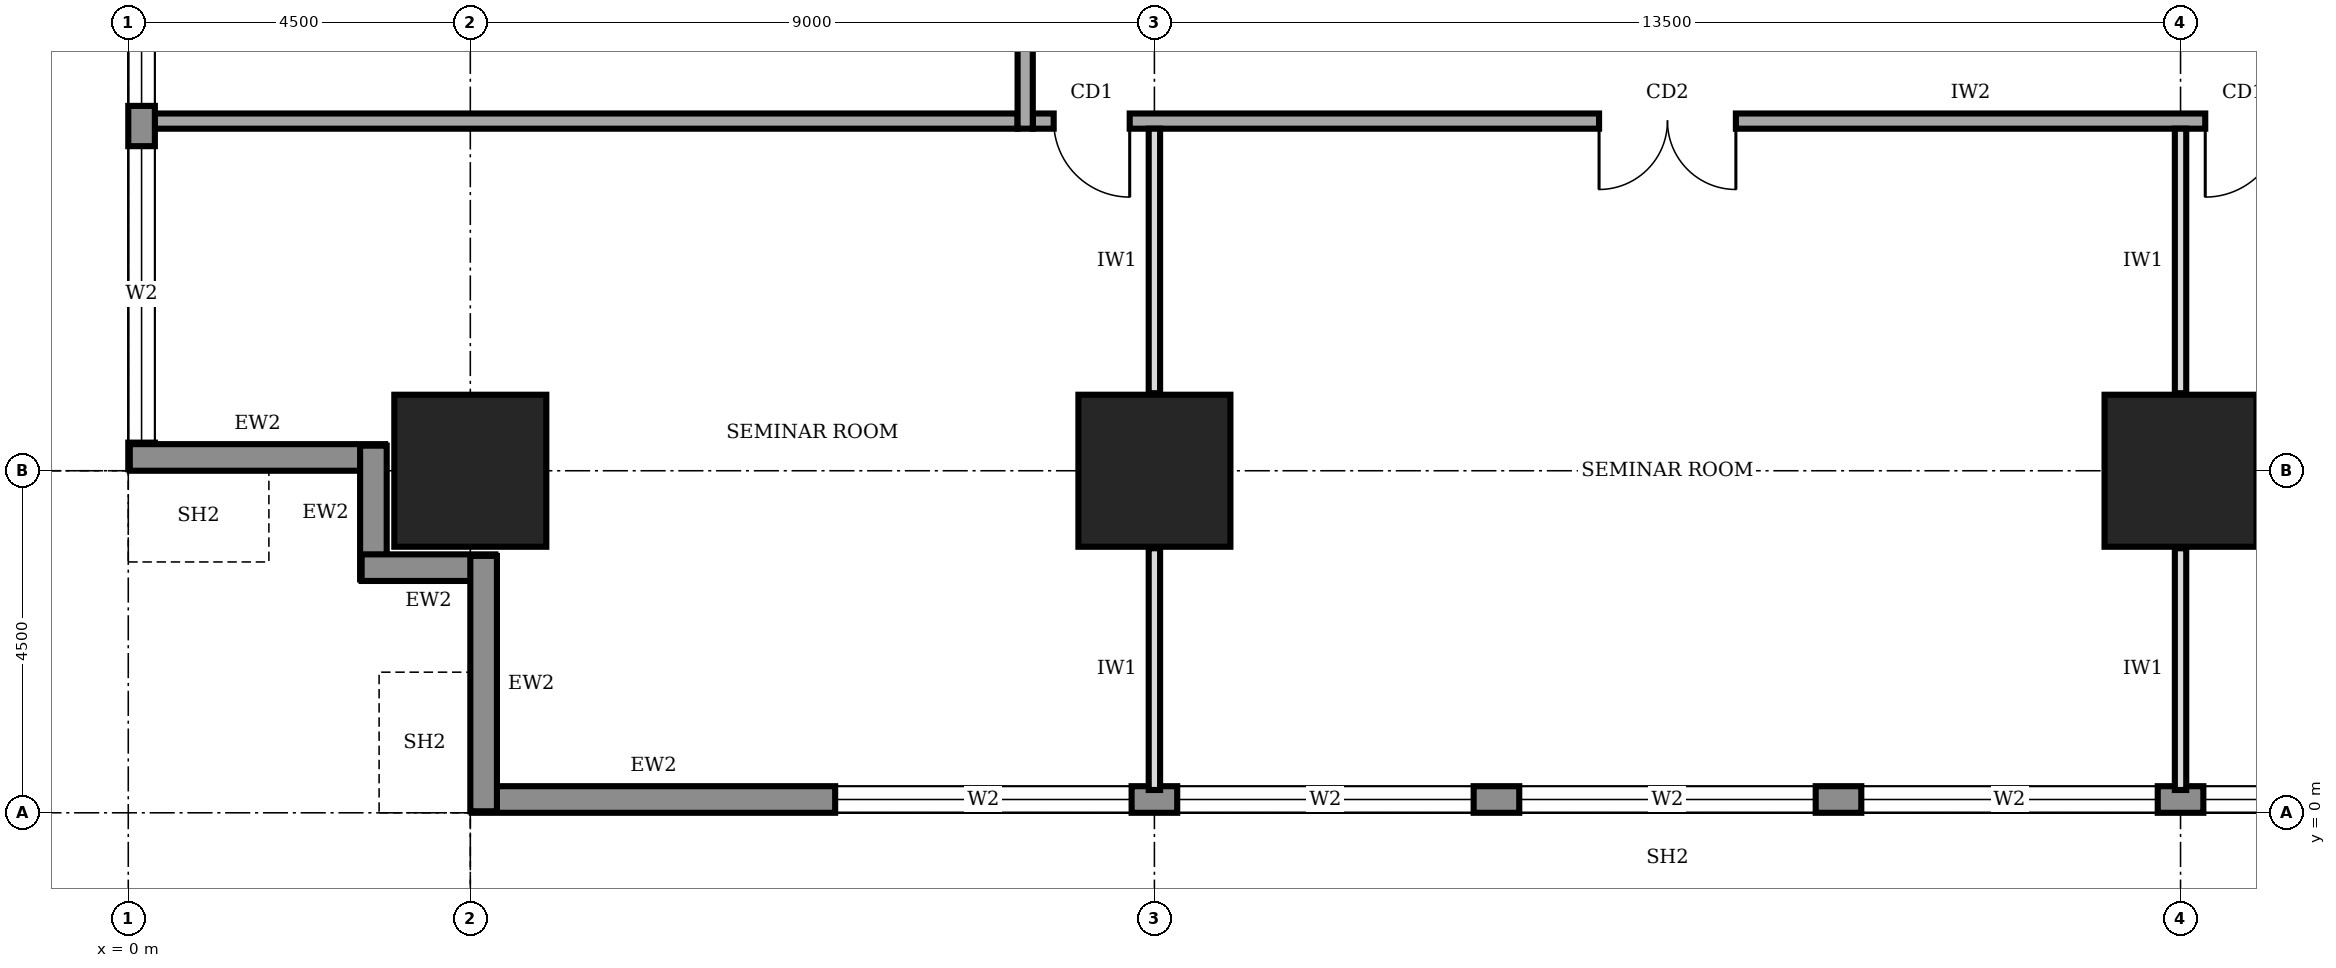
"""IFC4 building model, lengths in metres.
Left out: names, types, materials, properties, quantities, classifications, styles, units other than length and angle.
Written with IfcOpenShell. Run it as: python <this file> out.ifc"""

import sys

from ifc_helpers import new_model, si_unit, direction, frame, frame_2d, origin, origin_2d, place, context, subcontext, project, spatial, rectangle, extrude, element, fill, save


model = new_model("IFC4")
c1 = context("Model", 3, precision=1e-05, world=origin(), true_north=direction((0.0, 1.0)))
c2 = subcontext(c1, "Body", "Model", "MODEL_VIEW")
j1 = project(units=[si_unit("LENGTHUNIT", "METRE"), si_unit("PLANEANGLEUNIT", "RADIAN")], contexts=[c1])
p1 = place(None, origin())
s1 = spatial("IfcSite", under=j1, at=p1, CompositionType="ELEMENT")
p2 = place(p1, origin())
s2 = spatial("IfcBuilding", under=s1, at=p2, CompositionType="ELEMENT")
p3 = place(p2, frame((0.0, 0.0, 49.0)))
s3 = spatial("IfcBuildingStorey", under=s2, at=p3, CompositionType="ELEMENT", Elevation=49.0)
for number, where, z_axis, x_axis in (
    (1, (4.5, 4.5, 0.0), (0.0, 0.0, 1.0), (1.0, 0.0, 0.0)),
    (2, (13.5, 4.5, 0.0), (0.0, 0.0, 1.0), (1.0, 0.0, 0.0)),
    (3, (27.0, 4.5, 0.0), (0.0, 0.0, 1.0), (1.0, 0.0, 0.0)),
):
    element("IfcColumn", number, at=place(p3, frame(where, z_axis=z_axis, x_axis=x_axis)), inside=s3, PredefinedType="COLUMN", context=c2, shape_type="SweptSolid", body=[
        extrude(rectangle(XDim=2.0, YDim=2.0, at=origin_2d()), origin(), (0.0, 0.0, 1.0), 4.0),
    ])
p4 = place(p3, frame((4.52, 0.175, 0.0), z_axis=(0.0, 0.0, 1.0), x_axis=(1.0, 0.0, 0.0)))
e4 = element("IfcWall", 4, at=p4, inside=s3, PredefinedType="STANDARD", context=c2, shape_type="SweptSolid", body=[
    extrude(rectangle(XDim=31.46, YDim=0.35, at=frame_2d((15.73, 0.0))), origin(), (0.0, 0.0, 1.0), 3.75),
])
p5 = place(p4, frame((4.78, 0.0, 0.6)))
e5 = element("IfcOpeningElement", 5, at=p5, cuts=e4, PredefinedType="OPENING", context=c2, shape_type="SweptSolid", body=[
    extrude(rectangle(XDim=3.9, YDim=2.6, at=frame_2d((1.95, 1.3))), frame((0.0, 0.185, 0.0), z_axis=(0.0, -1.0, 0.0), x_axis=(1.0, 0.0, 0.0)), (0.0, 0.0, 1.0), 0.37),
])
p6 = place(p4, frame((9.28, 0.0, 0.6)))
e6 = element("IfcOpeningElement", 6, at=p6, cuts=e4, PredefinedType="OPENING", context=c2, shape_type="SweptSolid", body=[
    extrude(rectangle(XDim=3.9, YDim=2.6, at=frame_2d((1.95, 1.3))), frame((0.0, 0.185, 0.0), z_axis=(0.0, -1.0, 0.0), x_axis=(1.0, 0.0, 0.0)), (0.0, 0.0, 1.0), 0.37),
])
p7 = place(p4, frame((13.78, 0.0, 0.6)))
e7 = element("IfcOpeningElement", 7, at=p7, cuts=e4, PredefinedType="OPENING", context=c2, shape_type="SweptSolid", body=[
    extrude(rectangle(XDim=3.9, YDim=2.6, at=frame_2d((1.95, 1.3))), frame((0.0, 0.185, 0.0), z_axis=(0.0, -1.0, 0.0), x_axis=(1.0, 0.0, 0.0)), (0.0, 0.0, 1.0), 0.37),
])
p8 = place(p4, frame((18.28, 0.0, 0.6)))
e8 = element("IfcOpeningElement", 8, at=p8, cuts=e4, PredefinedType="OPENING", context=c2, shape_type="SweptSolid", body=[
    extrude(rectangle(XDim=3.9, YDim=2.6, at=frame_2d((1.95, 1.3))), frame((0.0, 0.185, 0.0), z_axis=(0.0, -1.0, 0.0), x_axis=(1.0, 0.0, 0.0)), (0.0, 0.0, 1.0), 0.37),
])
p9 = place(p4, frame((22.78, 0.0, 0.6)))
e9 = element("IfcOpeningElement", 9, at=p9, cuts=e4, PredefinedType="OPENING", context=c2, shape_type="SweptSolid", body=[
    extrude(rectangle(XDim=3.9, YDim=2.6, at=frame_2d((1.95, 1.3))), frame((0.0, 0.185, 0.0), z_axis=(0.0, -1.0, 0.0), x_axis=(1.0, 0.0, 0.0)), (0.0, 0.0, 1.0), 0.37),
])
p10 = place(p4, frame((27.21, 0.0, 0.6)))
e10 = element("IfcOpeningElement", 10, at=p10, cuts=e4, PredefinedType="OPENING", context=c2, shape_type="SweptSolid", body=[
    extrude(rectangle(XDim=3.9, YDim=2.6, at=frame_2d((1.95, 1.3))), frame((0.0, 0.185, 0.0), z_axis=(0.0, -1.0, 0.0), x_axis=(1.0, 0.0, 0.0)), (0.0, 0.0, 1.0), 0.37),
])
p11 = place(p3, frame((0.175, 35.98, 0.0), z_axis=(0.0, 0.0, 1.0), x_axis=(0.0, -1.0, 0.0)))
e11 = element("IfcWall", 11, at=p11, inside=s3, PredefinedType="STANDARD", context=c2, shape_type="SweptSolid", body=[
    extrude(rectangle(XDim=31.46, YDim=0.35, at=frame_2d((15.73, 0.0))), origin(), (0.0, 0.0, 1.0), 3.75),
])
p12 = place(p11, frame((27.21, 0.0, 0.6)))
e12 = element("IfcOpeningElement", 12, at=p12, cuts=e11, PredefinedType="OPENING", context=c2, shape_type="SweptSolid", body=[
    extrude(rectangle(XDim=3.9, YDim=2.6, at=frame_2d((1.95, 1.3))), frame((0.0, 0.185, 0.0), z_axis=(0.0, -1.0, 0.0), x_axis=(1.0, 0.0, 0.0)), (0.0, 0.0, 1.0), 0.37),
])
p13 = place(p11, frame((22.78, 0.0, 0.6)))
e13 = element("IfcOpeningElement", 13, at=p13, cuts=e11, PredefinedType="OPENING", context=c2, shape_type="SweptSolid", body=[
    extrude(rectangle(XDim=3.9, YDim=2.6, at=frame_2d((1.95, 1.3))), frame((0.0, 0.185, 0.0), z_axis=(0.0, -1.0, 0.0), x_axis=(1.0, 0.0, 0.0)), (0.0, 0.0, 1.0), 0.37),
])
p14 = place(p11, frame((18.28, 0.0, 0.6)))
e14 = element("IfcOpeningElement", 14, at=p14, cuts=e11, PredefinedType="OPENING", context=c2, shape_type="SweptSolid", body=[
    extrude(rectangle(XDim=3.9, YDim=2.6, at=frame_2d((1.95, 1.3))), frame((0.0, 0.185, 0.0), z_axis=(0.0, -1.0, 0.0), x_axis=(1.0, 0.0, 0.0)), (0.0, 0.0, 1.0), 0.37),
])
p15 = place(p11, frame((13.78, 0.0, 0.6)))
e15 = element("IfcOpeningElement", 15, at=p15, cuts=e11, PredefinedType="OPENING", context=c2, shape_type="SweptSolid", body=[
    extrude(rectangle(XDim=3.9, YDim=2.6, at=frame_2d((1.95, 1.3))), frame((0.0, 0.185, 0.0), z_axis=(0.0, -1.0, 0.0), x_axis=(1.0, 0.0, 0.0)), (0.0, 0.0, 1.0), 0.37),
])
p16 = place(p11, frame((9.28, 0.0, 0.6)))
e16 = element("IfcOpeningElement", 16, at=p16, cuts=e11, PredefinedType="OPENING", context=c2, shape_type="SweptSolid", body=[
    extrude(rectangle(XDim=3.9, YDim=2.6, at=frame_2d((1.95, 1.3))), frame((0.0, 0.185, 0.0), z_axis=(0.0, -1.0, 0.0), x_axis=(1.0, 0.0, 0.0)), (0.0, 0.0, 1.0), 0.37),
])
p17 = place(p11, frame((4.78, 0.0, 0.6)))
e17 = element("IfcOpeningElement", 17, at=p17, cuts=e11, PredefinedType="OPENING", context=c2, shape_type="SweptSolid", body=[
    extrude(rectangle(XDim=3.9, YDim=2.6, at=frame_2d((1.95, 1.3))), frame((0.0, 0.185, 0.0), z_axis=(0.0, -1.0, 0.0), x_axis=(1.0, 0.0, 0.0)), (0.0, 0.0, 1.0), 0.37),
])
p18 = place(p3, frame((0.02, 4.675, 0.0), z_axis=(0.0, 0.0, 1.0), x_axis=(1.0, 0.0, 0.0)))
e18 = element("IfcWall", 18, at=p18, inside=s3, PredefinedType="STANDARD", context=c2, shape_type="SweptSolid", body=[
    extrude(rectangle(XDim=3.36, YDim=0.35, at=frame_2d((1.68, 0.0))), origin(), (0.0, 0.0, 1.0), 2.85),
])
for number, where, z_axis, x_axis in (
    (19, (3.225, 4.83, 0.0), (0.0, 0.0, 1.0), (0.0, -1.0, 0.0)),
    (20, (3.07, 3.225, 0.0), (0.0, 0.0, 1.0), (1.0, 0.0, 0.0)),
):
    element("IfcWall", number, at=place(p3, frame(where, z_axis=z_axis, x_axis=x_axis)), inside=s3, PredefinedType="STANDARD", context=c2, shape_type="SweptSolid", body=[
        extrude(rectangle(XDim=1.76, YDim=0.35, at=frame_2d((0.88, 0.0))), origin(), (0.0, 0.0, 1.0), 3.75),
    ])
p19 = place(p3, frame((4.675, 3.38, 0.0), z_axis=(0.0, 0.0, 1.0), x_axis=(0.0, -1.0, 0.0)))
e21 = element("IfcWall", 21, at=p19, inside=s3, PredefinedType="STANDARD", context=c2, shape_type="SweptSolid", body=[
    extrude(rectangle(XDim=3.36, YDim=0.35, at=frame_2d((1.68, 0.0))), origin(), (0.0, 0.0, 1.0), 2.85),
])
p20 = place(p3, frame((11.9, 9.1, 0.0), z_axis=(0.0, 0.0, 1.0), x_axis=(1.0, 0.0, 0.0)))
e22 = element("IfcWall", 22, at=p20, inside=s3, PredefinedType="SOLIDWALL", context=c2, shape_type="SweptSolid", body=[
    extrude(rectangle(XDim=16.9, YDim=0.2, at=frame_2d((8.45, 0.0))), origin(), (0.0, 0.0, 1.0), 3.75),
])
p21 = place(p20, frame((0.275, 0.0, 0.0)))
e23 = element("IfcOpeningElement", 23, at=p21, cuts=e22, PredefinedType="OPENING", context=c2, shape_type="SweptSolid", body=[
    extrude(rectangle(XDim=1.0, YDim=2.1, at=frame_2d((0.5, 1.05))), frame((0.0, 0.11, 0.0), z_axis=(0.0, -1.0, 0.0), x_axis=(1.0, 0.0, 0.0)), (0.0, 0.0, 1.0), 0.22),
])
p22 = place(p20, frame((7.45, 0.0, 0.0)))
e24 = element("IfcOpeningElement", 24, at=p22, cuts=e22, PredefinedType="OPENING", context=c2, shape_type="SweptSolid", body=[
    extrude(rectangle(XDim=1.8, YDim=2.1, at=frame_2d((0.9, 1.05))), frame((0.0, 0.11, 0.0), z_axis=(0.0, -1.0, 0.0), x_axis=(1.0, 0.0, 0.0)), (0.0, 0.0, 1.0), 0.22),
])
p23 = place(p20, frame((15.425, 0.0, 0.0)))
e25 = element("IfcOpeningElement", 25, at=p23, cuts=e22, PredefinedType="OPENING", context=c2, shape_type="SweptSolid", body=[
    extrude(rectangle(XDim=1.0, YDim=2.1, at=frame_2d((0.5, 1.05))), frame((0.0, 0.11, 0.0), z_axis=(0.0, -1.0, 0.0), x_axis=(1.0, 0.0, 0.0)), (0.0, 0.0, 1.0), 0.22),
])
p24 = place(p3, frame((11.8, 32.8, 0.0), z_axis=(0.0, 0.0, 1.0), x_axis=(0.0, -1.0, 0.0)))
e26 = element("IfcWall", 26, at=p24, inside=s3, PredefinedType="SOLIDWALL", context=c2, shape_type="SweptSolid", body=[
    extrude(rectangle(XDim=23.8, YDim=0.2, at=frame_2d((11.9, 0.0))), origin(), (0.0, 0.0, 1.0), 3.75),
])
p25 = place(p24, frame((21.05, 0.0, 0.0)))
e27 = element("IfcOpeningElement", 27, at=p25, cuts=e26, PredefinedType="OPENING", context=c2, shape_type="SweptSolid", body=[
    extrude(rectangle(XDim=1.0, YDim=2.1, at=frame_2d((0.5, 1.05))), frame((0.0, 0.11, 0.0), z_axis=(0.0, -1.0, 0.0), x_axis=(1.0, 0.0, 0.0)), (0.0, 0.0, 1.0), 0.22),
])
p26 = place(p24, frame((17.15, 0.0, 0.0)))
e28 = element("IfcOpeningElement", 28, at=p26, cuts=e26, PredefinedType="OPENING", context=c2, shape_type="SweptSolid", body=[
    extrude(rectangle(XDim=0.9, YDim=2.1, at=frame_2d((0.45, 1.05))), frame((0.0, 0.11, 0.0), z_axis=(0.0, -1.0, 0.0), x_axis=(1.0, 0.0, 0.0)), (0.0, 0.0, 1.0), 0.22),
])
p27 = place(p24, frame((12.35, 0.0, 0.0)))
e29 = element("IfcOpeningElement", 29, at=p27, cuts=e26, PredefinedType="OPENING", context=c2, shape_type="SweptSolid", body=[
    extrude(rectangle(XDim=0.9, YDim=2.1, at=frame_2d((0.45, 1.05))), frame((0.0, 0.11, 0.0), z_axis=(0.0, -1.0, 0.0), x_axis=(1.0, 0.0, 0.0)), (0.0, 0.0, 1.0), 0.22),
])
p28 = place(p24, frame((9.3, 0.0, 0.0)))
e30 = element("IfcOpeningElement", 30, at=p28, cuts=e26, PredefinedType="OPENING", context=c2, shape_type="SweptSolid", body=[
    extrude(rectangle(XDim=0.9, YDim=2.1, at=frame_2d((0.45, 1.05))), frame((0.0, 0.11, 0.0), z_axis=(0.0, -1.0, 0.0), x_axis=(1.0, 0.0, 0.0)), (0.0, 0.0, 1.0), 0.22),
])
p29 = place(p24, frame((6.3, 0.0, 0.0)))
e31 = element("IfcOpeningElement", 31, at=p29, cuts=e26, PredefinedType="OPENING", context=c2, shape_type="SweptSolid", body=[
    extrude(rectangle(XDim=1.0, YDim=2.1, at=frame_2d((0.5, 1.05))), frame((0.0, 0.11, 0.0), z_axis=(0.0, -1.0, 0.0), x_axis=(1.0, 0.0, 0.0)), (0.0, 0.0, 1.0), 0.22),
])
p30 = place(p24, frame((14.4, 0.0, 0.0)))
e32 = element("IfcOpeningElement", 32, at=p30, cuts=e26, PredefinedType="OPENING", context=c2, shape_type="SweptSolid", body=[
    extrude(rectangle(XDim=1.0, YDim=2.1, at=frame_2d((0.5, 1.05))), frame((0.0, 0.11, 0.0), z_axis=(0.0, -1.0, 0.0), x_axis=(1.0, 0.0, 0.0)), (0.0, 0.0, 1.0), 0.22),
])
p31 = place(p24, frame((2.3, 0.0, 0.0)))
e33 = element("IfcOpeningElement", 33, at=p31, cuts=e26, PredefinedType="OPENING", context=c2, shape_type="SweptSolid", body=[
    extrude(rectangle(XDim=1.0, YDim=2.1, at=frame_2d((0.5, 1.05))), frame((0.0, 0.11, 0.0), z_axis=(0.0, -1.0, 0.0), x_axis=(1.0, 0.0, 0.0)), (0.0, 0.0, 1.0), 0.22),
])
p32 = place(p3, frame((0.3, 9.1, 0.0), z_axis=(0.0, 0.0, 1.0), x_axis=(1.0, 0.0, 0.0)))
e34 = element("IfcWall", 34, at=p32, inside=s3, PredefinedType="SOLIDWALL", context=c2, shape_type="SweptSolid", body=[
    extrude(rectangle(XDim=11.4, YDim=0.2, at=frame_2d((5.7, 0.0))), origin(), (0.0, 0.0, 1.0), 3.75),
])
p33 = place(p3, frame((13.5, 0.3, 0.0), z_axis=(0.0, 0.0, 1.0), x_axis=(0.0, 1.0, 0.0)))
e35 = element("IfcWall", 35, at=p33, inside=s3, PredefinedType="PARTITIONING", context=c2, shape_type="SweptSolid", body=[
    extrude(rectangle(XDim=3.18, YDim=0.15, at=frame_2d((1.59, 0.0))), origin(), (0.0, 0.0, 1.0), 2.85),
])
p34 = place(p3, frame((13.5, 5.52, 0.0), z_axis=(0.0, 0.0, 1.0), x_axis=(0.0, 1.0, 0.0)))
e36 = element("IfcWall", 36, at=p34, inside=s3, PredefinedType="PARTITIONING", context=c2, shape_type="SweptSolid", body=[
    extrude(rectangle(XDim=3.48, YDim=0.15, at=frame_2d((1.74, 0.0))), origin(), (0.0, 0.0, 1.0), 2.85),
])
p35 = place(p3, frame((27.0, 0.3, 0.0), z_axis=(0.0, 0.0, 1.0), x_axis=(0.0, 1.0, 0.0)))
e37 = element("IfcWall", 37, at=p35, inside=s3, PredefinedType="PARTITIONING", context=c2, shape_type="SweptSolid", body=[
    extrude(rectangle(XDim=3.18, YDim=0.15, at=frame_2d((1.59, 0.0))), origin(), (0.0, 0.0, 1.0), 2.85),
])
p36 = place(p3, frame((27.0, 5.52, 0.0), z_axis=(0.0, 0.0, 1.0), x_axis=(0.0, 1.0, 0.0)))
e38 = element("IfcWall", 38, at=p36, inside=s3, PredefinedType="PARTITIONING", context=c2, shape_type="SweptSolid", body=[
    extrude(rectangle(XDim=3.48, YDim=0.15, at=frame_2d((1.74, 0.0))), origin(), (0.0, 0.0, 1.0), 2.85),
])
p37 = place(p5, origin())
e39 = element("IfcWindow", 39, at=p37, inside=s3, PartitioningType="SINGLE_PANEL", PredefinedType="WINDOW", context=c2, shape_type="SweptSolid", body=[
    extrude(rectangle(XDim=3.9, YDim=2.6, at=frame_2d((1.95, 1.3))), frame((0.0, 0.03, 0.0), z_axis=(0.0, -1.0, 0.0), x_axis=(1.0, 0.0, 0.0)), (0.0, 0.0, 1.0), 0.06),
])
fill(e5, e39)
p38 = place(p6, origin())
e40 = element("IfcWindow", 40, at=p38, inside=s3, PartitioningType="SINGLE_PANEL", PredefinedType="WINDOW", context=c2, shape_type="SweptSolid", body=[
    extrude(rectangle(XDim=3.9, YDim=2.6, at=frame_2d((1.95, 1.3))), frame((0.0, 0.03, 0.0), z_axis=(0.0, -1.0, 0.0), x_axis=(1.0, 0.0, 0.0)), (0.0, 0.0, 1.0), 0.06),
])
fill(e6, e40)
p39 = place(p7, origin())
e41 = element("IfcWindow", 41, at=p39, inside=s3, PartitioningType="SINGLE_PANEL", PredefinedType="WINDOW", context=c2, shape_type="SweptSolid", body=[
    extrude(rectangle(XDim=3.9, YDim=2.6, at=frame_2d((1.95, 1.3))), frame((0.0, 0.03, 0.0), z_axis=(0.0, -1.0, 0.0), x_axis=(1.0, 0.0, 0.0)), (0.0, 0.0, 1.0), 0.06),
])
fill(e7, e41)
p40 = place(p8, origin())
e42 = element("IfcWindow", 42, at=p40, inside=s3, PartitioningType="SINGLE_PANEL", PredefinedType="WINDOW", context=c2, shape_type="SweptSolid", body=[
    extrude(rectangle(XDim=3.9, YDim=2.6, at=frame_2d((1.95, 1.3))), frame((0.0, 0.03, 0.0), z_axis=(0.0, -1.0, 0.0), x_axis=(1.0, 0.0, 0.0)), (0.0, 0.0, 1.0), 0.06),
])
fill(e8, e42)
p41 = place(p9, origin())
e43 = element("IfcWindow", 43, at=p41, inside=s3, PartitioningType="SINGLE_PANEL", PredefinedType="WINDOW", context=c2, shape_type="SweptSolid", body=[
    extrude(rectangle(XDim=3.9, YDim=2.6, at=frame_2d((1.95, 1.3))), frame((0.0, 0.03, 0.0), z_axis=(0.0, -1.0, 0.0), x_axis=(1.0, 0.0, 0.0)), (0.0, 0.0, 1.0), 0.06),
])
fill(e9, e43)
p42 = place(p12, origin())
e44 = element("IfcWindow", 44, at=p42, inside=s3, PartitioningType="SINGLE_PANEL", PredefinedType="WINDOW", context=c2, shape_type="SweptSolid", body=[
    extrude(rectangle(XDim=3.9, YDim=2.6, at=frame_2d((1.95, 1.3))), frame((0.0, 0.03, 0.0), z_axis=(0.0, -1.0, 0.0), x_axis=(1.0, 0.0, 0.0)), (0.0, 0.0, 1.0), 0.06),
])
fill(e12, e44)
p43 = place(p13, origin())
e45 = element("IfcWindow", 45, at=p43, inside=s3, PartitioningType="SINGLE_PANEL", PredefinedType="WINDOW", context=c2, shape_type="SweptSolid", body=[
    extrude(rectangle(XDim=3.9, YDim=2.6, at=frame_2d((1.95, 1.3))), frame((0.0, 0.03, 0.0), z_axis=(0.0, -1.0, 0.0), x_axis=(1.0, 0.0, 0.0)), (0.0, 0.0, 1.0), 0.06),
])
fill(e13, e45)
p44 = place(p21, frame((1.0, 0.0, 0.0), z_axis=(0.0, 0.0, 1.0), x_axis=(-1.0, 0.0, 0.0)))
e46 = element("IfcDoor", 46, at=p44, inside=s3, OperationType="SINGLE_SWING_LEFT", PredefinedType="DOOR", context=c2, shape_type="SweptSolid", body=[
    extrude(rectangle(XDim=1.0, YDim=2.1, at=frame_2d((0.5, 1.05))), frame((0.0, 0.025, 0.0), z_axis=(0.0, -1.0, 0.0), x_axis=(1.0, 0.0, 0.0)), (0.0, 0.0, 1.0), 0.05),
])
fill(e23, e46)
p45 = place(p22, frame((1.8, 0.0, 0.0), z_axis=(0.0, 0.0, 1.0), x_axis=(-1.0, 0.0, 0.0)))
e47 = element("IfcDoor", 47, at=p45, inside=s3, OperationType="DOUBLE_DOOR_SINGLE_SWING", PredefinedType="DOOR", context=c2, shape_type="SweptSolid", body=[
    extrude(rectangle(XDim=1.8, YDim=2.1, at=frame_2d((0.9, 1.05))), frame((0.0, 0.025, 0.0), z_axis=(0.0, -1.0, 0.0), x_axis=(1.0, 0.0, 0.0)), (0.0, 0.0, 1.0), 0.05),
])
fill(e24, e47)
p46 = place(p23, frame((1.0, 0.0, 0.0), z_axis=(0.0, 0.0, 1.0), x_axis=(-1.0, 0.0, 0.0)))
e48 = element("IfcDoor", 48, at=p46, inside=s3, OperationType="SINGLE_SWING_RIGHT", PredefinedType="DOOR", context=c2, shape_type="SweptSolid", body=[
    extrude(rectangle(XDim=1.0, YDim=2.1, at=frame_2d((0.5, 1.05))), frame((0.0, 0.025, 0.0), z_axis=(0.0, -1.0, 0.0), x_axis=(1.0, 0.0, 0.0)), (0.0, 0.0, 1.0), 0.05),
])
fill(e25, e48)
save(model, sys.argv[1])
